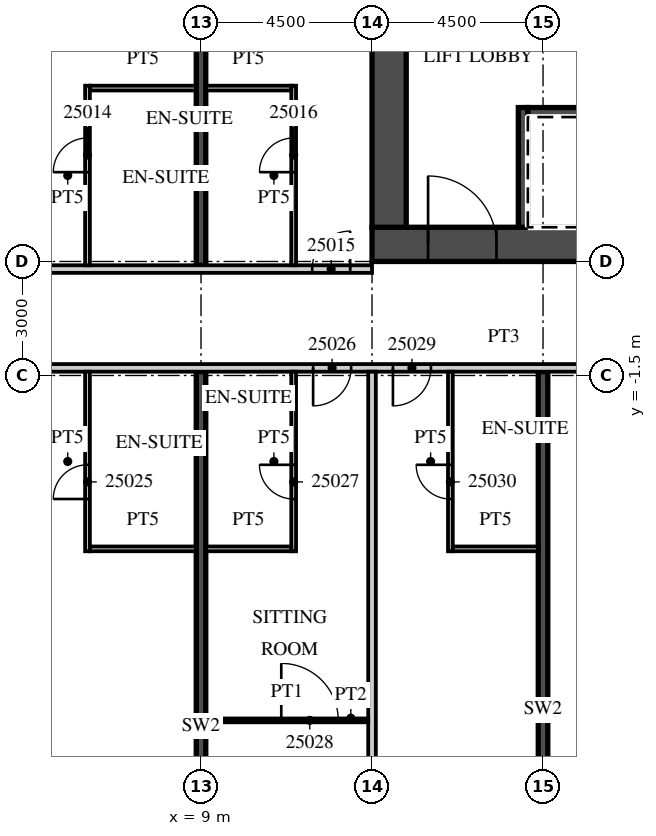
"""IFC4 building model, lengths in metres.
Left out: names, types, materials, properties, quantities, classifications, styles, units other than length and angle.
Written with IfcOpenShell. Run it as: python <this file> out.ifc"""

import sys

from ifc_helpers import new_model, si_unit, direction, frame, frame_2d, origin, place, context, subcontext, project, spatial, rectangle, extrude, element, fill, save


model = new_model("IFC4")
c1 = context("Model", 3, precision=1e-05, world=origin(), true_north=direction((0.0, 1.0)))
c2 = subcontext(c1, "Body", "Model", "MODEL_VIEW")
j1 = project(units=[si_unit("LENGTHUNIT", "METRE"), si_unit("PLANEANGLEUNIT", "RADIAN")], contexts=[c1])
p1 = place(None, origin())
s1 = spatial("IfcSite", under=j1, at=p1, CompositionType="ELEMENT")
p2 = place(p1, origin())
s2 = spatial("IfcBuilding", under=s1, at=p2, CompositionType="ELEMENT")
p3 = place(p2, frame((0.0, 0.0, 117.4)))
s3 = spatial("IfcBuildingStorey", under=s2, at=p3, CompositionType="ELEMENT", Elevation=117.4)
p4 = place(p3, frame((9.0, -20.044, 0.0), z_axis=(0.0, 0.0, 1.0), x_axis=(0.0, 1.0, 0.0)))
e1 = element("IfcWall", 1, at=p4, inside=s3, PredefinedType="SHEAR", context=c2, shape_type="SweptSolid", body=[
    extrude(rectangle(XDim=18.644, YDim=0.25, at=frame_2d((9.322, 0.0))), origin(), (0.0, 0.0, 1.0), 3.3),
])
p5 = place(p3, frame((9.0, 1.4, 0.0), z_axis=(0.0, 0.0, 1.0), x_axis=(0.0, 1.0, 0.0)))
e2 = element("IfcWall", 2, at=p5, inside=s3, PredefinedType="SHEAR", context=c2, shape_type="SweptSolid", body=[
    extrude(rectangle(XDim=20.807, YDim=0.25, at=frame_2d((10.403, 0.0))), origin(), (0.0, 0.0, 1.0), 3.3),
])
p6 = place(p3, frame((18.0, -19.177, 0.0), z_axis=(0.0, 0.0, 1.0), x_axis=(0.0, 1.0, 0.0)))
e3 = element("IfcWall", 3, at=p6, inside=s3, PredefinedType="SHEAR", context=c2, shape_type="SweptSolid", body=[
    extrude(rectangle(XDim=17.777, YDim=0.25, at=frame_2d((8.889, 0.0))), origin(), (0.0, 0.0, 1.0), 3.3),
])
p7 = place(p3, frame((-39.316, 1.3, 0.0), z_axis=(0.0, 0.0, 1.0), x_axis=(1.0, 0.0, 0.0)))
e4 = element("IfcWall", 4, at=p7, inside=s3, PredefinedType="PARTITIONING", context=c2, shape_type="SweptSolid", body=[
    extrude(rectangle(XDim=52.816, YDim=0.2, at=frame_2d((26.408, 0.0))), origin(), (0.0, 0.0, 1.0), 3.02),
])
p8 = place(p7, frame((0.15, 0.0, 0.0)))
e5 = element("IfcOpeningElement", 5, at=p8, cuts=e4, PredefinedType="OPENING", context=c2, shape_type="SweptSolid", body=[
    extrude(rectangle(XDim=0.9, YDim=2.1, at=frame_2d((0.45, 1.05))), frame((0.0, 0.11, 0.0), z_axis=(0.0, -1.0, 0.0), x_axis=(1.0, 0.0, 0.0)), (0.0, 0.0, 1.0), 0.22),
])
p9 = place(p7, frame((6.266, 0.0, 0.0)))
e6 = element("IfcOpeningElement", 6, at=p9, cuts=e4, PredefinedType="OPENING", context=c2, shape_type="SweptSolid", body=[
    extrude(rectangle(XDim=1.0, YDim=2.1, at=frame_2d((0.5, 1.05))), frame((0.0, 0.11, 0.0), z_axis=(0.0, -1.0, 0.0), x_axis=(1.0, 0.0, 0.0)), (0.0, 0.0, 1.0), 0.22),
])
p10 = place(p7, frame((10.741, 0.0, 0.0)))
e7 = element("IfcOpeningElement", 7, at=p10, cuts=e4, PredefinedType="OPENING", context=c2, shape_type="SweptSolid", body=[
    extrude(rectangle(XDim=1.0, YDim=2.1, at=frame_2d((0.5, 1.05))), frame((0.0, 0.11, 0.0), z_axis=(0.0, -1.0, 0.0), x_axis=(1.0, 0.0, 0.0)), (0.0, 0.0, 1.0), 0.22),
])
p11 = place(p7, frame((17.678, 0.0, 0.0)))
e8 = element("IfcOpeningElement", 8, at=p11, cuts=e4, PredefinedType="OPENING", context=c2, shape_type="SweptSolid", body=[
    extrude(rectangle(XDim=1.2, YDim=2.1, at=frame_2d((0.6, 1.05))), frame((0.0, 0.11, 0.0), z_axis=(0.0, -1.0, 0.0), x_axis=(1.0, 0.0, 0.0)), (0.0, 0.0, 1.0), 0.22),
])
p12 = place(p7, frame((26.678, 0.0, 0.0)))
e9 = element("IfcOpeningElement", 9, at=p12, cuts=e4, PredefinedType="OPENING", context=c2, shape_type="SweptSolid", body=[
    extrude(rectangle(XDim=1.2, YDim=2.1, at=frame_2d((0.6, 1.05))), frame((0.0, 0.11, 0.0), z_axis=(0.0, -1.0, 0.0), x_axis=(1.0, 0.0, 0.0)), (0.0, 0.0, 1.0), 0.22),
])
p13 = place(p7, frame((35.678, 0.0, 0.0)))
e10 = element("IfcOpeningElement", 10, at=p13, cuts=e4, PredefinedType="OPENING", context=c2, shape_type="SweptSolid", body=[
    extrude(rectangle(XDim=1.2, YDim=2.1, at=frame_2d((0.6, 1.05))), frame((0.0, 0.11, 0.0), z_axis=(0.0, -1.0, 0.0), x_axis=(1.0, 0.0, 0.0)), (0.0, 0.0, 1.0), 0.22),
])
p14 = place(p7, frame((41.754, 0.0, 0.0)))
e11 = element("IfcOpeningElement", 11, at=p14, cuts=e4, PredefinedType="OPENING", context=c2, shape_type="SweptSolid", body=[
    extrude(rectangle(XDim=1.2, YDim=2.1, at=frame_2d((0.6, 1.05))), frame((0.0, 0.11, 0.0), z_axis=(0.0, -1.0, 0.0), x_axis=(1.0, 0.0, 0.0)), (0.0, 0.0, 1.0), 0.22),
])
p15 = place(p7, frame((51.241, 0.0, 0.0)))
e12 = element("IfcOpeningElement", 12, at=p15, cuts=e4, PredefinedType="OPENING", context=c2, shape_type="SweptSolid", body=[
    extrude(rectangle(XDim=1.0, YDim=2.1, at=frame_2d((0.5, 1.05))), frame((0.0, 0.11, 0.0), z_axis=(0.0, -1.0, 0.0), x_axis=(1.0, 0.0, 0.0)), (0.0, 0.0, 1.0), 0.22),
])
p16 = place(p3, frame((6.013, 1.4, 0.0), z_axis=(0.0, 0.0, 1.0), x_axis=(0.0, 1.0, 0.0)))
e13 = element("IfcWall", 13, at=p16, inside=s3, PredefinedType="PARTITIONING", context=c2, shape_type="SweptSolid", body=[
    extrude(rectangle(XDim=4.725, YDim=0.125, at=frame_2d((2.363, 0.0))), origin(), (0.0, 0.0, 1.0), 3.02),
])
p17 = place(p16, frame((2.45, 0.0, 0.0)))
e14 = element("IfcOpeningElement", 14, at=p17, cuts=e13, PredefinedType="OPENING", context=c2, shape_type="SweptSolid", body=[
    extrude(rectangle(XDim=0.9, YDim=2.1, at=frame_2d((0.45, 1.05))), frame((0.0, 0.073, 0.0), z_axis=(0.0, -1.0, 0.0), x_axis=(1.0, 0.0, 0.0)), (0.0, 0.0, 1.0), 0.145),
])
p18 = place(p3, frame((6.075, 6.062, 0.0), z_axis=(0.0, 0.0, 1.0), x_axis=(1.0, 0.0, 0.0)))
e15 = element("IfcWall", 15, at=p18, inside=s3, PredefinedType="PARTITIONING", context=c2, shape_type="SweptSolid", body=[
    extrude(rectangle(XDim=2.8, YDim=0.125, at=frame_2d((1.4, 0.0))), origin(), (0.0, 0.0, 1.0), 3.02),
])
p19 = place(p3, frame((11.438, 1.4, 0.0), z_axis=(0.0, 0.0, 1.0), x_axis=(0.0, 1.0, 0.0)))
e16 = element("IfcWall", 16, at=p19, inside=s3, PredefinedType="PARTITIONING", context=c2, shape_type="SweptSolid", body=[
    extrude(rectangle(XDim=4.725, YDim=0.125, at=frame_2d((2.363, 0.0))), origin(), (0.0, 0.0, 1.0), 3.02),
])
p20 = place(p19, frame((2.45, 0.0, 0.0)))
e17 = element("IfcOpeningElement", 17, at=p20, cuts=e16, PredefinedType="OPENING", context=c2, shape_type="SweptSolid", body=[
    extrude(rectangle(XDim=0.9, YDim=2.1, at=frame_2d((0.45, 1.05))), frame((0.0, 0.073, 0.0), z_axis=(0.0, -1.0, 0.0), x_axis=(1.0, 0.0, 0.0)), (0.0, 0.0, 1.0), 0.145),
])
p21 = place(p3, frame((9.125, 6.062, 0.0), z_axis=(0.0, 0.0, 1.0), x_axis=(1.0, 0.0, 0.0)))
e18 = element("IfcWall", 18, at=p21, inside=s3, PredefinedType="PARTITIONING", context=c2, shape_type="SweptSolid", body=[
    extrude(rectangle(XDim=2.25, YDim=0.125, at=frame_2d((1.125, 0.0))), origin(), (0.0, 0.0, 1.0), 3.02),
])
p22 = place(p3, frame((-13.5, -1.3, 0.0), z_axis=(0.0, 0.0, 1.0), x_axis=(1.0, 0.0, 0.0)))
e19 = element("IfcWall", 19, at=p22, inside=s3, PredefinedType="PARTITIONING", context=c2, shape_type="SweptSolid", body=[
    extrude(rectangle(XDim=60.932, YDim=0.2, at=frame_2d((30.466, 0.0))), origin(), (0.0, 0.0, 1.0), 3.02),
])
p23 = place(p22, frame((0.575, 0.0, 0.0)))
e20 = element("IfcOpeningElement", 20, at=p23, cuts=e19, PredefinedType="OPENING", context=c2, shape_type="SweptSolid", body=[
    extrude(rectangle(XDim=1.0, YDim=2.1, at=frame_2d((0.5, 1.05))), frame((0.0, 0.11, 0.0), z_axis=(0.0, -1.0, 0.0), x_axis=(1.0, 0.0, 0.0)), (0.0, 0.0, 1.0), 0.22),
])
p24 = place(p22, frame((5.075, 0.0, 0.0)))
e21 = element("IfcOpeningElement", 21, at=p24, cuts=e19, PredefinedType="OPENING", context=c2, shape_type="SweptSolid", body=[
    extrude(rectangle(XDim=1.0, YDim=2.1, at=frame_2d((0.5, 1.05))), frame((0.0, 0.11, 0.0), z_axis=(0.0, -1.0, 0.0), x_axis=(1.0, 0.0, 0.0)), (0.0, 0.0, 1.0), 0.22),
])
p25 = place(p22, frame((11.925, 0.0, 0.0)))
e22 = element("IfcOpeningElement", 22, at=p25, cuts=e19, PredefinedType="OPENING", context=c2, shape_type="SweptSolid", body=[
    extrude(rectangle(XDim=1.0, YDim=2.1, at=frame_2d((0.5, 1.05))), frame((0.0, 0.11, 0.0), z_axis=(0.0, -1.0, 0.0), x_axis=(1.0, 0.0, 0.0)), (0.0, 0.0, 1.0), 0.22),
])
p26 = place(p22, frame((15.938, 0.0, 0.0)))
e23 = element("IfcOpeningElement", 23, at=p26, cuts=e19, PredefinedType="OPENING", context=c2, shape_type="SweptSolid", body=[
    extrude(rectangle(XDim=1.2, YDim=2.1, at=frame_2d((0.6, 1.05))), frame((0.0, 0.11, 0.0), z_axis=(0.0, -1.0, 0.0), x_axis=(1.0, 0.0, 0.0)), (0.0, 0.0, 1.0), 0.22),
])
p27 = place(p22, frame((25.45, 0.0, 0.0)))
e24 = element("IfcOpeningElement", 24, at=p27, cuts=e19, PredefinedType="OPENING", context=c2, shape_type="SweptSolid", body=[
    extrude(rectangle(XDim=1.0, YDim=2.1, at=frame_2d((0.5, 1.05))), frame((0.0, 0.11, 0.0), z_axis=(0.0, -1.0, 0.0), x_axis=(1.0, 0.0, 0.0)), (0.0, 0.0, 1.0), 0.22),
])
p28 = place(p22, frame((27.55, 0.0, 0.0)))
e25 = element("IfcOpeningElement", 25, at=p28, cuts=e19, PredefinedType="OPENING", context=c2, shape_type="SweptSolid", body=[
    extrude(rectangle(XDim=1.0, YDim=2.1, at=frame_2d((0.5, 1.05))), frame((0.0, 0.11, 0.0), z_axis=(0.0, -1.0, 0.0), x_axis=(1.0, 0.0, 0.0)), (0.0, 0.0, 1.0), 0.22),
])
p29 = place(p22, frame((33.938, 0.0, 0.0)))
e26 = element("IfcOpeningElement", 26, at=p29, cuts=e19, PredefinedType="OPENING", context=c2, shape_type="SweptSolid", body=[
    extrude(rectangle(XDim=1.2, YDim=2.1, at=frame_2d((0.6, 1.05))), frame((0.0, 0.11, 0.0), z_axis=(0.0, -1.0, 0.0), x_axis=(1.0, 0.0, 0.0)), (0.0, 0.0, 1.0), 0.22),
])
p30 = place(p22, frame((45.862, 0.0, 0.0)))
e27 = element("IfcOpeningElement", 27, at=p30, cuts=e19, PredefinedType="OPENING", context=c2, shape_type="SweptSolid", body=[
    extrude(rectangle(XDim=1.2, YDim=2.1, at=frame_2d((0.6, 1.05))), frame((0.0, 0.11, 0.0), z_axis=(0.0, -1.0, 0.0), x_axis=(1.0, 0.0, 0.0)), (0.0, 0.0, 1.0), 0.22),
])
p31 = place(p22, frame((52.425, 0.0, 0.0)))
e28 = element("IfcOpeningElement", 28, at=p31, cuts=e19, PredefinedType="OPENING", context=c2, shape_type="SweptSolid", body=[
    extrude(rectangle(XDim=1.0, YDim=2.1, at=frame_2d((0.5, 1.05))), frame((0.0, 0.11, 0.0), z_axis=(0.0, -1.0, 0.0), x_axis=(1.0, 0.0, 0.0)), (0.0, 0.0, 1.0), 0.22),
])
p32 = place(p22, frame((56.95, 0.0, 0.0)))
e29 = element("IfcOpeningElement", 29, at=p32, cuts=e19, PredefinedType="OPENING", context=c2, shape_type="SweptSolid", body=[
    extrude(rectangle(XDim=1.0, YDim=2.1, at=frame_2d((0.5, 1.05))), frame((0.0, 0.11, 0.0), z_axis=(0.0, -1.0, 0.0), x_axis=(1.0, 0.0, 0.0)), (0.0, 0.0, 1.0), 0.22),
])
p33 = place(p22, frame((59.882, 0.0, 0.0)))
e30 = element("IfcOpeningElement", 30, at=p33, cuts=e19, PredefinedType="OPENING", context=c2, shape_type="SweptSolid", body=[
    extrude(rectangle(XDim=0.9, YDim=2.1, at=frame_2d((0.45, 1.05))), frame((0.0, 0.11, 0.0), z_axis=(0.0, -1.0, 0.0), x_axis=(1.0, 0.0, 0.0)), (0.0, 0.0, 1.0), 0.22),
])
p34 = place(p3, frame((6.013, -6.125, 0.0), z_axis=(0.0, 0.0, 1.0), x_axis=(0.0, 1.0, 0.0)))
e31 = element("IfcWall", 31, at=p34, inside=s3, PredefinedType="PARTITIONING", context=c2, shape_type="SweptSolid", body=[
    extrude(rectangle(XDim=4.725, YDim=0.125, at=frame_2d((2.363, 0.0))), origin(), (0.0, 0.0, 1.0), 3.02),
])
p35 = place(p34, frame((1.375, 0.0, 0.0)))
e32 = element("IfcOpeningElement", 32, at=p35, cuts=e31, PredefinedType="OPENING", context=c2, shape_type="SweptSolid", body=[
    extrude(rectangle(XDim=0.9, YDim=2.1, at=frame_2d((0.45, 1.05))), frame((0.0, 0.073, 0.0), z_axis=(0.0, -1.0, 0.0), x_axis=(1.0, 0.0, 0.0)), (0.0, 0.0, 1.0), 0.145),
])
p36 = place(p3, frame((6.075, -6.062, 0.0), z_axis=(0.0, 0.0, 1.0), x_axis=(1.0, 0.0, 0.0)))
e33 = element("IfcWall", 33, at=p36, inside=s3, PredefinedType="PARTITIONING", context=c2, shape_type="SweptSolid", body=[
    extrude(rectangle(XDim=2.8, YDim=0.125, at=frame_2d((1.4, 0.0))), origin(), (0.0, 0.0, 1.0), 3.02),
])
p37 = place(p3, frame((13.5, -19.633, 0.0), z_axis=(0.0, 0.0, 1.0), x_axis=(0.0, 1.0, 0.0)))
e34 = element("IfcWall", 34, at=p37, inside=s3, PredefinedType="PARTITIONING", context=c2, shape_type="SweptSolid", body=[
    extrude(rectangle(XDim=18.233, YDim=0.2, at=frame_2d((9.117, 0.0))), origin(), (0.0, 0.0, 1.0), 3.02),
])
p38 = place(p3, frame((11.438, -6.125, 0.0), z_axis=(0.0, 0.0, 1.0), x_axis=(0.0, 1.0, 0.0)))
e35 = element("IfcWall", 35, at=p38, inside=s3, PredefinedType="PARTITIONING", context=c2, shape_type="SweptSolid", body=[
    extrude(rectangle(XDim=4.725, YDim=0.125, at=frame_2d((2.363, 0.0))), origin(), (0.0, 0.0, 1.0), 3.02),
])
p39 = place(p38, frame((1.375, 0.0, 0.0)))
e36 = element("IfcOpeningElement", 36, at=p39, cuts=e35, PredefinedType="OPENING", context=c2, shape_type="SweptSolid", body=[
    extrude(rectangle(XDim=0.9, YDim=2.1, at=frame_2d((0.45, 1.05))), frame((0.0, 0.073, 0.0), z_axis=(0.0, -1.0, 0.0), x_axis=(1.0, 0.0, 0.0)), (0.0, 0.0, 1.0), 0.145),
])
p40 = place(p3, frame((9.125, -6.062, 0.0), z_axis=(0.0, 0.0, 1.0), x_axis=(1.0, 0.0, 0.0)))
e37 = element("IfcWall", 37, at=p40, inside=s3, PredefinedType="PARTITIONING", context=c2, shape_type="SweptSolid", body=[
    extrude(rectangle(XDim=2.25, YDim=0.125, at=frame_2d((1.125, 0.0))), origin(), (0.0, 0.0, 1.0), 3.02),
])
p41 = place(p3, frame((9.125, -10.575, 0.0), z_axis=(0.0, 0.0, 1.0), x_axis=(1.0, 0.0, 0.0)))
e38 = element("IfcWall", 38, at=p41, inside=s3, PredefinedType="PARTITIONING", context=c2, shape_type="SweptSolid", body=[
    extrude(rectangle(XDim=4.275, YDim=0.1, at=frame_2d((2.137, 0.0))), origin(), (0.0, 0.0, 1.0), 3.02),
])
p42 = place(p41, frame((1.987, 0.0, 0.0)))
e39 = element("IfcOpeningElement", 39, at=p42, cuts=e38, PredefinedType="OPENING", context=c2, shape_type="SweptSolid", body=[
    extrude(rectangle(XDim=1.5, YDim=2.1, at=frame_2d((0.75, 1.05))), frame((0.0, 0.06, 0.0), z_axis=(0.0, -1.0, 0.0), x_axis=(1.0, 0.0, 0.0)), (0.0, 0.0, 1.0), 0.12),
])
p43 = place(p3, frame((15.562, -6.125, 0.0), z_axis=(0.0, 0.0, 1.0), x_axis=(0.0, 1.0, 0.0)))
e40 = element("IfcWall", 40, at=p43, inside=s3, PredefinedType="PARTITIONING", context=c2, shape_type="SweptSolid", body=[
    extrude(rectangle(XDim=4.725, YDim=0.125, at=frame_2d((2.363, 0.0))), origin(), (0.0, 0.0, 1.0), 3.02),
])
p44 = place(p43, frame((1.375, 0.0, 0.0)))
e41 = element("IfcOpeningElement", 41, at=p44, cuts=e40, PredefinedType="OPENING", context=c2, shape_type="SweptSolid", body=[
    extrude(rectangle(XDim=0.9, YDim=2.1, at=frame_2d((0.45, 1.05))), frame((0.0, 0.073, 0.0), z_axis=(0.0, -1.0, 0.0), x_axis=(1.0, 0.0, 0.0)), (0.0, 0.0, 1.0), 0.145),
])
p45 = place(p3, frame((15.625, -6.062, 0.0), z_axis=(0.0, 0.0, 1.0), x_axis=(1.0, 0.0, 0.0)))
e42 = element("IfcWall", 42, at=p45, inside=s3, PredefinedType="PARTITIONING", context=c2, shape_type="SweptSolid", body=[
    extrude(rectangle(XDim=2.25, YDim=0.125, at=frame_2d((1.125, 0.0))), origin(), (0.0, 0.0, 1.0), 3.02),
])
p46 = place(p3, frame((13.5, 1.95, 0.0), z_axis=(0.0, 0.0, 1.0), x_axis=(1.0, 0.0, 0.0)))
e43 = element("IfcWall", 43, at=p46, inside=s3, PredefinedType="SHEAR", context=c2, shape_type="SweptSolid", body=[
    extrude(rectangle(XDim=18.0, YDim=0.9, at=frame_2d((9.0, 0.0))), origin(), (0.0, 0.0, 1.0), 3.02),
])
p47 = place(p46, frame((1.475, 0.0, 0.0)))
e44 = element("IfcOpeningElement", 44, at=p47, cuts=e43, PredefinedType="OPENING", context=c2, shape_type="SweptSolid", body=[
    extrude(rectangle(XDim=1.8, YDim=2.1, at=frame_2d((0.9, 1.05))), frame((0.0, 0.46, 0.0), z_axis=(0.0, -1.0, 0.0), x_axis=(1.0, 0.0, 0.0)), (0.0, 0.0, 1.0), 0.92),
])
p48 = place(p3, frame((13.95, 2.4, 0.0), z_axis=(0.0, 0.0, 1.0), x_axis=(0.0, 1.0, 0.0)))
e45 = element("IfcWall", 45, at=p48, inside=s3, PredefinedType="SHEAR", context=c2, shape_type="SweptSolid", body=[
    extrude(rectangle(XDim=12.2, YDim=0.9, at=frame_2d((6.1, 0.0))), origin(), (0.0, 0.0, 1.0), 3.02),
])
p49 = place(p3, frame((17.6, 5.425, 0.0), z_axis=(0.0, 0.0, 1.0), x_axis=(1.0, 0.0, 0.0)))
e46 = element("IfcWall", 46, at=p49, inside=s3, PredefinedType="SHEAR", context=c2, shape_type="SweptSolid", body=[
    extrude(rectangle(XDim=13.0, YDim=0.25, at=frame_2d((6.5, 0.0))), origin(), (0.0, 0.0, 1.0), 3.02),
])
p50 = place(p3, frame((17.475, 2.4, 0.0), z_axis=(0.0, 0.0, 1.0), x_axis=(0.0, 1.0, 0.0)))
e47 = element("IfcWall", 47, at=p50, inside=s3, PredefinedType="SHEAR", context=c2, shape_type="SweptSolid", body=[
    extrude(rectangle(XDim=3.15, YDim=0.25, at=frame_2d((1.575, 0.0))), origin(), (0.0, 0.0, 1.0), 3.02),
])
p51 = place(p17, origin())
e48 = element("IfcDoor", 48, at=p51, inside=s3, OperationType="SINGLE_SWING_LEFT", PredefinedType="DOOR", context=c2, shape_type="SweptSolid", body=[
    extrude(rectangle(XDim=0.9, YDim=2.1, at=frame_2d((0.45, 1.05))), frame((0.0, 0.025, 0.0), z_axis=(0.0, -1.0, 0.0), x_axis=(1.0, 0.0, 0.0)), (0.0, 0.0, 1.0), 0.05),
])
fill(e14, e48)
p52 = place(p15, origin())
e49 = element("IfcDoor", 49, at=p52, inside=s3, OperationType="SINGLE_SWING_RIGHT", PredefinedType="DOOR", context=c2, shape_type="SweptSolid", body=[
    extrude(rectangle(XDim=1.0, YDim=2.1, at=frame_2d((0.5, 1.05))), frame((0.0, 0.025, 0.0), z_axis=(0.0, -1.0, 0.0), x_axis=(1.0, 0.0, 0.0)), (0.0, 0.0, 1.0), 0.05),
])
fill(e12, e49)
p53 = place(p20, origin())
e50 = element("IfcDoor", 50, at=p53, inside=s3, OperationType="SINGLE_SWING_LEFT", PredefinedType="DOOR", context=c2, shape_type="SweptSolid", body=[
    extrude(rectangle(XDim=0.9, YDim=2.1, at=frame_2d((0.45, 1.05))), frame((0.0, 0.025, 0.0), z_axis=(0.0, -1.0, 0.0), x_axis=(1.0, 0.0, 0.0)), (0.0, 0.0, 1.0), 0.05),
])
fill(e17, e50)
p54 = place(p35, origin())
e51 = element("IfcDoor", 51, at=p54, inside=s3, OperationType="SINGLE_SWING_LEFT", PredefinedType="DOOR", context=c2, shape_type="SweptSolid", body=[
    extrude(rectangle(XDim=0.9, YDim=2.1, at=frame_2d((0.45, 1.05))), frame((0.0, 0.025, 0.0), z_axis=(0.0, -1.0, 0.0), x_axis=(1.0, 0.0, 0.0)), (0.0, 0.0, 1.0), 0.05),
])
fill(e32, e51)
p55 = place(p27, origin())
e52 = element("IfcDoor", 52, at=p55, inside=s3, OperationType="SINGLE_SWING_LEFT", PredefinedType="DOOR", context=c2, shape_type="SweptSolid", body=[
    extrude(rectangle(XDim=1.0, YDim=2.1, at=frame_2d((0.5, 1.05))), frame((0.0, 0.025, 0.0), z_axis=(0.0, -1.0, 0.0), x_axis=(1.0, 0.0, 0.0)), (0.0, 0.0, 1.0), 0.05),
])
fill(e24, e52)
p56 = place(p39, origin())
e53 = element("IfcDoor", 53, at=p56, inside=s3, OperationType="SINGLE_SWING_RIGHT", PredefinedType="DOOR", context=c2, shape_type="SweptSolid", body=[
    extrude(rectangle(XDim=0.9, YDim=2.1, at=frame_2d((0.45, 1.05))), frame((0.0, 0.025, 0.0), z_axis=(0.0, -1.0, 0.0), x_axis=(1.0, 0.0, 0.0)), (0.0, 0.0, 1.0), 0.05),
])
fill(e36, e53)
p57 = place(p42, origin())
e54 = element("IfcDoor", 54, at=p57, inside=s3, OperationType="SINGLE_SWING_LEFT", PredefinedType="DOOR", context=c2, shape_type="SweptSolid", body=[
    extrude(rectangle(XDim=1.5, YDim=2.1, at=frame_2d((0.75, 1.05))), frame((0.0, 0.025, 0.0), z_axis=(0.0, -1.0, 0.0), x_axis=(1.0, 0.0, 0.0)), (0.0, 0.0, 1.0), 0.05),
])
fill(e39, e54)
p58 = place(p28, origin())
e55 = element("IfcDoor", 55, at=p58, inside=s3, OperationType="SINGLE_SWING_LEFT", PredefinedType="DOOR", context=c2, shape_type="SweptSolid", body=[
    extrude(rectangle(XDim=1.0, YDim=2.1, at=frame_2d((0.5, 1.05))), frame((0.0, 0.025, 0.0), z_axis=(0.0, -1.0, 0.0), x_axis=(1.0, 0.0, 0.0)), (0.0, 0.0, 1.0), 0.05),
])
fill(e25, e55)
p59 = place(p44, origin())
e56 = element("IfcDoor", 56, at=p59, inside=s3, OperationType="SINGLE_SWING_RIGHT", PredefinedType="DOOR", context=c2, shape_type="SweptSolid", body=[
    extrude(rectangle(XDim=0.9, YDim=2.1, at=frame_2d((0.45, 1.05))), frame((0.0, 0.025, 0.0), z_axis=(0.0, -1.0, 0.0), x_axis=(1.0, 0.0, 0.0)), (0.0, 0.0, 1.0), 0.05),
])
fill(e41, e56)
p60 = place(p47, origin())
e57 = element("IfcDoor", 57, at=p60, inside=s3, OperationType="DOUBLE_DOOR_DOUBLE_SWING", PredefinedType="DOOR", context=c2, shape_type="SweptSolid", body=[
    extrude(rectangle(XDim=1.8, YDim=2.1, at=frame_2d((0.9, 1.05))), frame((0.0, 0.025, 0.0), z_axis=(0.0, -1.0, 0.0), x_axis=(1.0, 0.0, 0.0)), (0.0, 0.0, 1.0), 0.05),
])
fill(e44, e57)
save(model, sys.argv[1])
